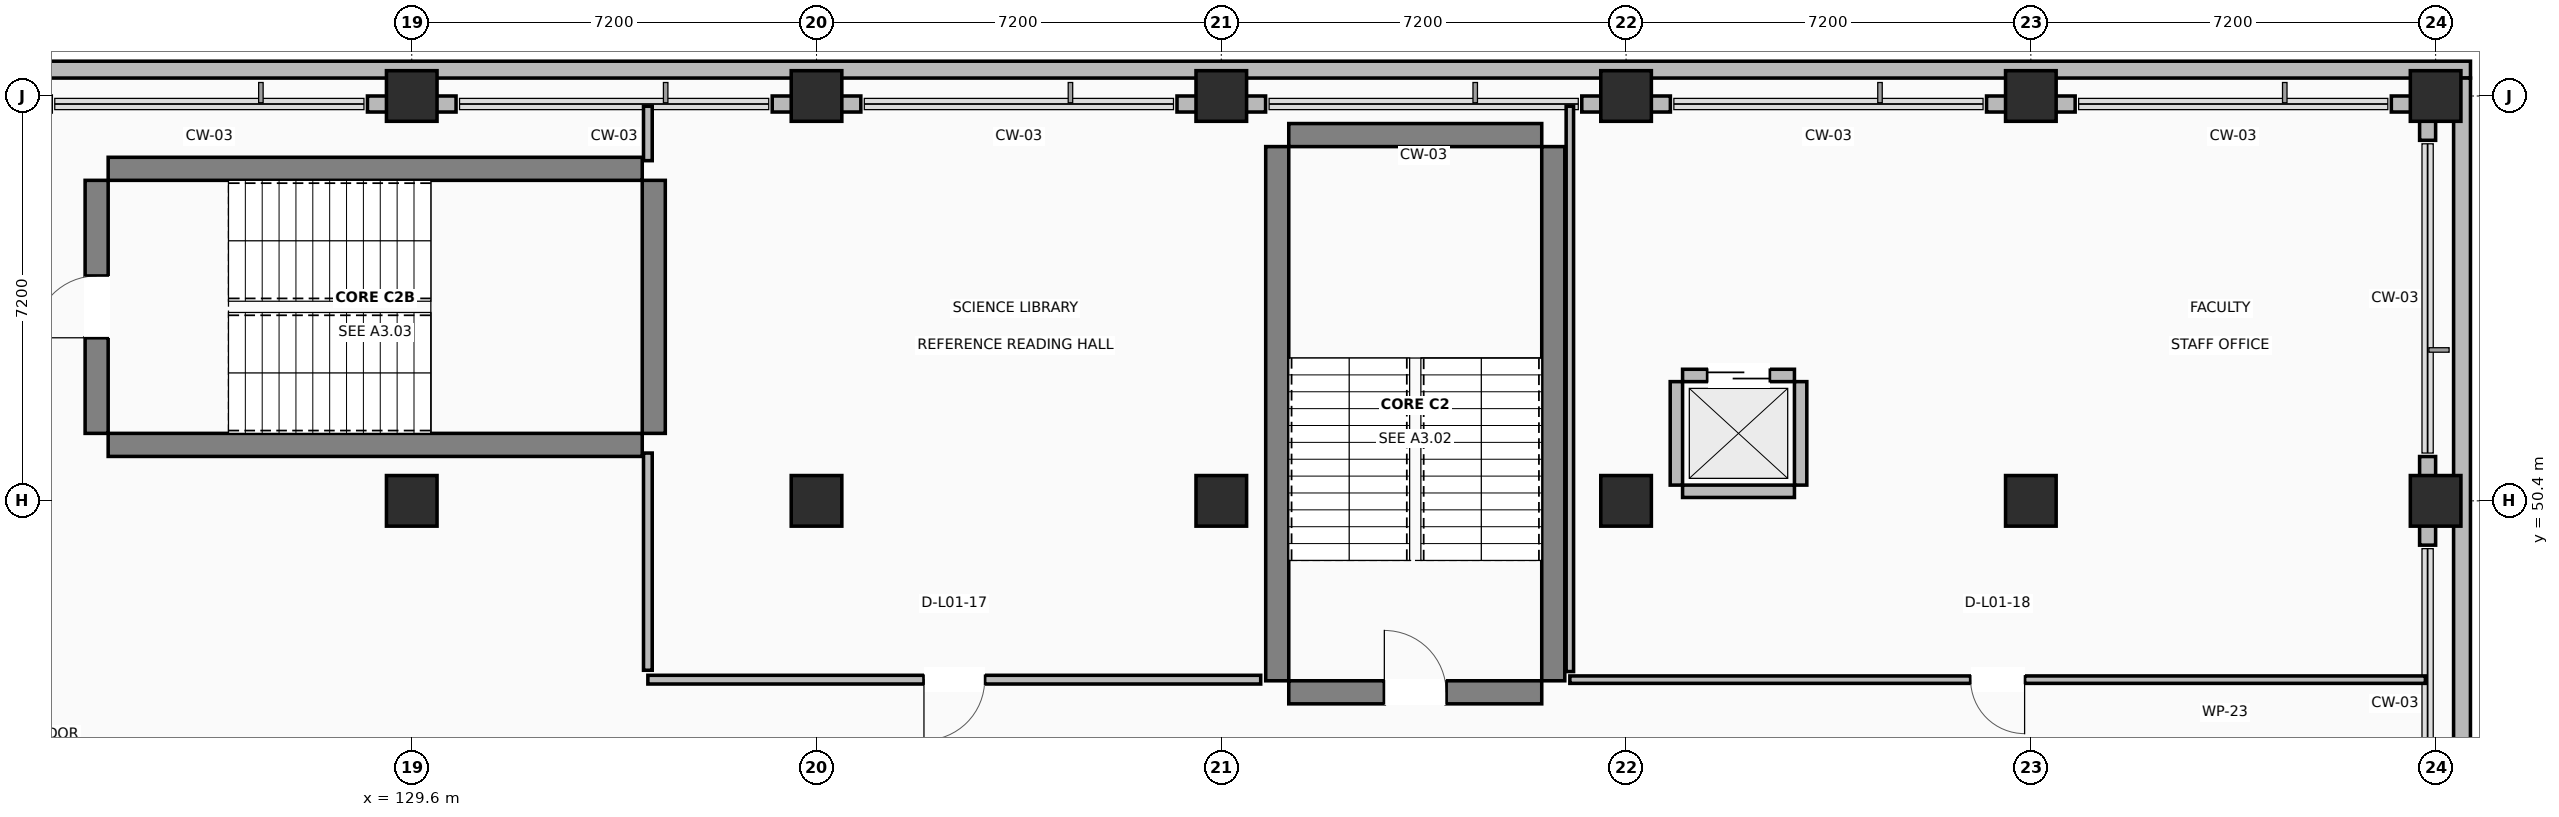
"""IFC4 building model, lengths in metres.
Left out: names, types, materials, properties, quantities, classifications, styles, units other than length and angle.
Written with IfcOpenShell. Run it as: python <this file> out.ifc"""

import sys

from ifc_helpers import new_model, si_unit, direction, frame, frame_2d, origin, origin_2d, place, context, subcontext, project, spatial, rectangle, extrude, element, fill, save


model = new_model("IFC4")
c1 = context("Model", 3, precision=1e-05, world=origin(), true_north=direction((0.0, 1.0)))
c2 = subcontext(c1, "Body", "Model", "MODEL_VIEW")
j1 = project(units=[si_unit("LENGTHUNIT", "METRE"), si_unit("PLANEANGLEUNIT", "RADIAN")], contexts=[c1])
p1 = place(None, origin())
s1 = spatial("IfcSite", under=j1, at=p1, CompositionType="ELEMENT")
p2 = place(p1, origin())
s2 = spatial("IfcBuilding", under=s1, at=p2, CompositionType="ELEMENT")
p3 = place(p2, frame((0.0, 0.0, 4.5)))
s3 = spatial("IfcBuildingStorey", under=s2, at=p3, CompositionType="ELEMENT", Elevation=4.5)
for number, where, z_axis, x_axis in (
    (1, (129.6, 50.4, 0.0), (0.0, 0.0, 1.0), (1.0, 0.0, 0.0)),
    (2, (129.6, 57.6, 0.0), (0.0, 0.0, 1.0), (1.0, 0.0, 0.0)),
    (3, (136.8, 50.4, 0.0), (0.0, 0.0, 1.0), (1.0, 0.0, 0.0)),
    (4, (136.8, 57.6, 0.0), (0.0, 0.0, 1.0), (1.0, 0.0, 0.0)),
    (5, (144.0, 50.4, 0.0), (0.0, 0.0, 1.0), (1.0, 0.0, 0.0)),
    (6, (144.0, 57.6, 0.0), (0.0, 0.0, 1.0), (1.0, 0.0, 0.0)),
    (7, (151.2, 50.4, 0.0), (0.0, 0.0, 1.0), (1.0, 0.0, 0.0)),
    (8, (151.2, 57.6, 0.0), (0.0, 0.0, 1.0), (1.0, 0.0, 0.0)),
    (9, (158.4, 50.4, 0.0), (0.0, 0.0, 1.0), (1.0, 0.0, 0.0)),
    (10, (158.4, 57.6, 0.0), (0.0, 0.0, 1.0), (1.0, 0.0, 0.0)),
    (11, (165.6, 50.4, 0.0), (0.0, 0.0, 1.0), (1.0, 0.0, 0.0)),
    (12, (165.6, 57.6, 0.0), (0.0, 0.0, 1.0), (1.0, 0.0, 0.0)),
):
    element("IfcColumn", number, at=place(p3, frame(where, z_axis=z_axis, x_axis=x_axis)), inside=s3, PredefinedType="COLUMN", context=c2, shape_type="SweptSolid", body=[
        extrude(rectangle(XDim=0.9, YDim=0.9, at=origin_2d()), origin(), (0.0, 0.0, 1.0), 4.22),
    ])
p4 = place(p3, frame((145.2, 46.995, 0.0), z_axis=(0.0, 0.0, 1.0), x_axis=(1.0, 0.0, 0.0)))
e13 = element("IfcWall", 13, at=p4, inside=s3, PredefinedType="SHEAR", context=c2, shape_type="SweptSolid", body=[
    extrude(rectangle(XDim=4.5, YDim=0.41, at=frame_2d((2.25, 0.0))), origin(), (0.0, 0.0, 1.0), 4.22),
])
p5 = place(p4, frame((1.7, 0.0, 0.0)))
e14 = element("IfcOpeningElement", 14, at=p5, cuts=e13, PredefinedType="OPENING", context=c2, shape_type="SweptSolid", body=[
    extrude(rectangle(XDim=1.1, YDim=2.15, at=frame_2d((0.55, 1.075))), frame((0.0, 0.215, 0.0), z_axis=(0.0, -1.0, 0.0), x_axis=(1.0, 0.0, 0.0)), (0.0, 0.0, 1.0), 0.43),
])
p6 = place(p3, frame((145.2, 56.905, 0.0), z_axis=(0.0, 0.0, 1.0), x_axis=(1.0, 0.0, 0.0)))
e15 = element("IfcWall", 15, at=p6, inside=s3, PredefinedType="SHEAR", context=c2, shape_type="SweptSolid", body=[
    extrude(rectangle(XDim=4.5, YDim=0.41, at=frame_2d((2.25, 0.0))), origin(), (0.0, 0.0, 1.0), 4.22),
])
for number, where, z_axis, x_axis in (
    (16, (144.995, 47.2, 0.0), (0.0, 0.0, 1.0), (0.0, 1.0, 0.0)),
    (17, (149.905, 47.2, 0.0), (0.0, 0.0, 1.0), (0.0, 1.0, 0.0)),
    (18, (124.2, 51.395, 0.0), (0.0, 0.0, 1.0), (1.0, 0.0, 0.0)),
    (19, (124.2, 56.305, 0.0), (0.0, 0.0, 1.0), (1.0, 0.0, 0.0)),
):
    element("IfcWall", number, at=place(p3, frame(where, z_axis=z_axis, x_axis=x_axis)), inside=s3, PredefinedType="SHEAR", context=c2, shape_type="SweptSolid", body=[
        extrude(rectangle(XDim=9.5, YDim=0.41, at=frame_2d((4.75, 0.0))), origin(), (0.0, 0.0, 1.0), 4.22),
    ])
p7 = place(p3, frame((123.995, 51.6, 0.0), z_axis=(0.0, 0.0, 1.0), x_axis=(0.0, 1.0, 0.0)))
e20 = element("IfcWall", 20, at=p7, inside=s3, PredefinedType="SHEAR", context=c2, shape_type="SweptSolid", body=[
    extrude(rectangle(XDim=4.5, YDim=0.41, at=frame_2d((2.25, 0.0))), origin(), (0.0, 0.0, 1.0), 4.22),
])
p8 = place(p7, frame((1.7, 0.0, 0.0)))
e21 = element("IfcOpeningElement", 21, at=p8, cuts=e20, PredefinedType="OPENING", context=c2, shape_type="SweptSolid", body=[
    extrude(rectangle(XDim=1.1, YDim=2.15, at=frame_2d((0.55, 1.075))), frame((0.0, 0.215, 0.0), z_axis=(0.0, -1.0, 0.0), x_axis=(1.0, 0.0, 0.0)), (0.0, 0.0, 1.0), 0.43),
])
p9 = place(p3, frame((133.905, 51.6, 0.0), z_axis=(0.0, 0.0, 1.0), x_axis=(0.0, 1.0, 0.0)))
e22 = element("IfcWall", 22, at=p9, inside=s3, PredefinedType="SHEAR", context=c2, shape_type="SweptSolid", body=[
    extrude(rectangle(XDim=4.5, YDim=0.41, at=frame_2d((2.25, 0.0))), origin(), (0.0, 0.0, 1.0), 4.22),
])
p10 = place(p3, frame((165.458, 49.612, 0.0), z_axis=(0.0, 0.0, 1.0), x_axis=(0.0, 1.0, 0.0)))
e23 = element("IfcWall", 23, at=p10, inside=s3, PredefinedType="STANDARD", context=c2, shape_type="SweptSolid", body=[
    extrude(rectangle(XDim=1.576, YDim=0.285, at=frame_2d((0.788, 0.0))), origin(), (0.0, 0.0, 1.0), 3.26),
])
p11 = place(p3, frame((165.458, 56.812, 0.0), z_axis=(0.0, 0.0, 1.0), x_axis=(0.0, 1.0, 0.0)))
e24 = element("IfcWall", 24, at=p11, inside=s3, PredefinedType="STANDARD", context=c2, shape_type="SweptSolid", body=[
    extrude(rectangle(XDim=0.503, YDim=0.285, at=frame_2d((0.251, 0.0))), origin(), (0.0, 0.0, 1.0), 3.26),
])
p12 = place(p3, frame((165.6, 57.458, 0.0), z_axis=(0.0, 0.0, 1.0), x_axis=(-1.0, 0.0, 0.0)))
e25 = element("IfcWall", 25, at=p12, inside=s3, PredefinedType="STANDARD", context=c2, shape_type="SweptSolid", body=[
    extrude(rectangle(XDim=0.788, YDim=0.285, at=frame_2d((0.394, 0.0))), origin(), (0.0, 0.0, 1.0), 3.26),
])
for number, where, z_axis, x_axis in (
    (26, (159.188, 57.458, 0.0), (0.0, 0.0, 1.0), (-1.0, 0.0, 0.0)),
    (27, (151.988, 57.458, 0.0), (0.0, 0.0, 1.0), (-1.0, 0.0, 0.0)),
):
    element("IfcWall", number, at=place(p3, frame(where, z_axis=z_axis, x_axis=x_axis)), inside=s3, PredefinedType="STANDARD", context=c2, shape_type="SweptSolid", body=[
        extrude(rectangle(XDim=1.576, YDim=0.285, at=frame_2d((0.788, 0.0))), origin(), (0.0, 0.0, 1.0), 3.26),
    ])
p13 = place(p3, frame((144.788, 57.458, 0.0), z_axis=(0.0, 0.0, 1.0), x_axis=(-1.0, 0.0, 0.0)))
e28 = element("IfcWall", 28, at=p13, inside=s3, PredefinedType="STANDARD", context=c2, shape_type="SweptSolid", body=[
    extrude(rectangle(XDim=1.576, YDim=0.285, at=frame_2d((0.788, 0.0))), origin(), (0.0, 0.0, 1.0), 3.26),
])
for number, where, z_axis, x_axis in (
    (29, (137.588, 57.458, 0.0), (0.0, 0.0, 1.0), (-1.0, 0.0, 0.0)),
    (30, (130.388, 57.458, 0.0), (0.0, 0.0, 1.0), (-1.0, 0.0, 0.0)),
):
    element("IfcWall", number, at=place(p3, frame(where, z_axis=z_axis, x_axis=x_axis)), inside=s3, PredefinedType="STANDARD", context=c2, shape_type="SweptSolid", body=[
        extrude(rectangle(XDim=1.576, YDim=0.285, at=frame_2d((0.788, 0.0))), origin(), (0.0, 0.0, 1.0), 3.26),
    ])
p14 = place(p3, frame((114.58, 58.069, 0.0), z_axis=(0.0, 0.0, 1.0), x_axis=(1.0, 0.0, 0.0)))
e31 = element("IfcWall", 31, at=p14, inside=s3, PredefinedType="PARAPET", context=c2, shape_type="SweptSolid", body=[
    extrude(rectangle(XDim=51.64, YDim=0.3, at=frame_2d((25.82, 0.0))), origin(), (0.0, 0.0, 1.0), 1.18),
])
p15 = place(p3, frame((166.07, 57.919, 0.0), z_axis=(0.0, 0.0, 1.0), x_axis=(-4.0288871e-05, -0.999999999188, 0.0)))
e32 = element("IfcWall", 32, at=p15, inside=s3, PredefinedType="PARAPET", context=c2, shape_type="SweptSolid", body=[
    extrude(rectangle(XDim=24.239, YDim=0.3, at=frame_2d((12.12, 0.0))), origin(), (0.0, 0.0, 1.0), 1.18),
])
p16 = place(p3, frame((152.205, 50.57, 0.0), z_axis=(0.0, 0.0, 1.0), x_axis=(1.0, 0.0, 0.0)))
e33 = element("IfcWall", 33, at=p16, inside=s3, PredefinedType="STANDARD", context=c2, shape_type="SweptSolid", body=[
    extrude(rectangle(XDim=1.99, YDim=0.22, at=frame_2d((0.995, 0.0))), origin(), (0.0, 0.0, 1.0), 3.26),
])
p17 = place(p3, frame((152.205, 52.63, 0.0), z_axis=(0.0, 0.0, 1.0), x_axis=(1.0, 0.0, 0.0)))
e34 = element("IfcWall", 34, at=p17, inside=s3, PredefinedType="STANDARD", context=c2, shape_type="SweptSolid", body=[
    extrude(rectangle(XDim=1.99, YDim=0.22, at=frame_2d((0.995, 0.0))), origin(), (0.0, 0.0, 1.0), 3.26),
])
p18 = place(p17, frame((0.445, 0.0, 0.0)))
e35 = element("IfcOpeningElement", 35, at=p18, cuts=e34, PredefinedType="OPENING", context=c2, shape_type="SweptSolid", body=[
    extrude(rectangle(XDim=1.1, YDim=2.15, at=frame_2d((0.55, 1.075))), frame((0.0, 0.12, 0.0), z_axis=(0.0, -1.0, 0.0), x_axis=(1.0, 0.0, 0.0)), (0.0, 0.0, 1.0), 0.24),
])
for number, where, z_axis, x_axis in (
    (36, (152.095, 50.68, 0.0), (0.0, 0.0, 1.0), (0.0, 1.0, 0.0)),
    (37, (154.305, 50.68, 0.0), (0.0, 0.0, 1.0), (0.0, 1.0, 0.0)),
):
    element("IfcWall", number, at=place(p3, frame(where, z_axis=z_axis, x_axis=x_axis)), inside=s3, PredefinedType="STANDARD", context=c2, shape_type="SweptSolid", body=[
        extrude(rectangle(XDim=1.84, YDim=0.22, at=frame_2d((0.92, 0.0))), origin(), (0.0, 0.0, 1.0), 3.26),
    ])
p19 = place(p3, frame((144.701, 47.22, 0.0), z_axis=(0.0, 0.0, 1.0), x_axis=(-1.0, 0.0, 0.0)))
e38 = element("IfcWall", 38, at=p19, inside=s3, PredefinedType="PARTITIONING", context=c2, shape_type="SweptSolid", body=[
    extrude(rectangle(XDim=10.901, YDim=0.155, at=frame_2d((5.45, 0.0))), origin(), (0.0, 0.0, 1.0), 3.26),
])
p20 = place(p19, frame((4.91, 0.0, 0.0)))
e39 = element("IfcOpeningElement", 39, at=p20, cuts=e38, PredefinedType="OPENING", context=c2, shape_type="SweptSolid", body=[
    extrude(rectangle(XDim=1.08, YDim=2.15, at=frame_2d((0.54, 1.075))), frame((0.0, 0.087, 0.0), z_axis=(0.0, -1.0, 0.0), x_axis=(1.0, 0.0, 0.0)), (0.0, 0.0, 1.0), 0.175),
])
p21 = place(p3, frame((133.8, 47.387, 0.0), z_axis=(0.0, 0.0, 1.0), x_axis=(0.0, 1.0, 0.0)))
e40 = element("IfcWall", 40, at=p21, inside=s3, PredefinedType="PARTITIONING", context=c2, shape_type="SweptSolid", body=[
    extrude(rectangle(XDim=3.863, YDim=0.155, at=frame_2d((1.932, 0.0))), origin(), (0.0, 0.0, 1.0), 3.26),
])
p22 = place(p3, frame((133.8, 56.45, 0.0), z_axis=(0.0, 0.0, 1.0), x_axis=(0.0, 1.0, 0.0)))
e41 = element("IfcWall", 41, at=p22, inside=s3, PredefinedType="PARTITIONING", context=c2, shape_type="SweptSolid", body=[
    extrude(rectangle(XDim=0.968, YDim=0.155, at=frame_2d((0.484, 0.0))), origin(), (0.0, 0.0, 1.0), 3.26),
])
p23 = place(p3, frame((165.418, 47.22, 0.0), z_axis=(0.0, 0.0, 1.0), x_axis=(-1.0, 0.0, 0.0)))
e42 = element("IfcWall", 42, at=p23, inside=s3, PredefinedType="PARTITIONING", context=c2, shape_type="SweptSolid", body=[
    extrude(rectangle(XDim=15.218, YDim=0.132, at=frame_2d((7.609, 0.0))), origin(), (0.0, 0.0, 1.0), 3.26),
])
p24 = place(p23, frame((7.129, 0.0, 0.0)))
e43 = element("IfcOpeningElement", 43, at=p24, cuts=e42, PredefinedType="OPENING", context=c2, shape_type="SweptSolid", body=[
    extrude(rectangle(XDim=0.96, YDim=2.1, at=frame_2d((0.48, 1.05))), frame((0.0, 0.076, 0.0), z_axis=(0.0, -1.0, 0.0), x_axis=(1.0, 0.0, 0.0)), (0.0, 0.0, 1.0), 0.152),
])
p25 = place(p3, frame((150.2, 47.364, 0.0), z_axis=(0.0, 0.0, 1.0), x_axis=(0.0, 1.0, 0.0)))
e44 = element("IfcWall", 44, at=p25, inside=s3, PredefinedType="PARTITIONING", context=c2, shape_type="SweptSolid", body=[
    extrude(rectangle(XDim=10.054, YDim=0.132, at=frame_2d((5.027, 0.0))), origin(), (0.0, 0.0, 1.0), 3.26),
])
p26 = place(p5, origin())
e45 = element("IfcDoor", 45, at=p26, inside=s3, OperationType="SINGLE_SWING_LEFT", PredefinedType="DOOR", context=c2, shape_type="SweptSolid", body=[
    extrude(rectangle(XDim=1.1, YDim=2.15, at=frame_2d((0.55, 1.075))), frame((0.0, 0.025, 0.0), z_axis=(0.0, -1.0, 0.0), x_axis=(1.0, 0.0, 0.0)), (0.0, 0.0, 1.0), 0.05),
])
fill(e14, e45)
p27 = place(p8, origin())
e46 = element("IfcDoor", 46, at=p27, inside=s3, OperationType="SINGLE_SWING_LEFT", PredefinedType="DOOR", context=c2, shape_type="SweptSolid", body=[
    extrude(rectangle(XDim=1.1, YDim=2.15, at=frame_2d((0.55, 1.075))), frame((0.0, 0.025, 0.0), z_axis=(0.0, -1.0, 0.0), x_axis=(1.0, 0.0, 0.0)), (0.0, 0.0, 1.0), 0.05),
])
fill(e21, e46)
p28 = place(p18, origin())
e47 = element("IfcDoor", 47, at=p28, inside=s3, OperationType="SLIDING_TO_LEFT", PredefinedType="DOOR", context=c2, shape_type="SweptSolid", body=[
    extrude(rectangle(XDim=1.1, YDim=2.15, at=frame_2d((0.55, 1.075))), frame((0.0, 0.025, 0.0), z_axis=(0.0, -1.0, 0.0), x_axis=(1.0, 0.0, 0.0)), (0.0, 0.0, 1.0), 0.05),
])
fill(e35, e47)
p29 = place(p20, origin())
e48 = element("IfcDoor", 48, at=p29, inside=s3, OperationType="SINGLE_SWING_RIGHT", PredefinedType="DOOR", context=c2, shape_type="SweptSolid", body=[
    extrude(rectangle(XDim=1.08, YDim=2.15, at=frame_2d((0.54, 1.075))), frame((0.0, 0.025, 0.0), z_axis=(0.0, -1.0, 0.0), x_axis=(1.0, 0.0, 0.0)), (0.0, 0.0, 1.0), 0.05),
])
fill(e39, e48)
p30 = place(p24, origin())
e49 = element("IfcDoor", 49, at=p30, inside=s3, OperationType="SINGLE_SWING_LEFT", PredefinedType="DOOR", context=c2, shape_type="SweptSolid", body=[
    extrude(rectangle(XDim=0.96, YDim=2.1, at=frame_2d((0.48, 1.05))), frame((0.0, 0.025, 0.0), z_axis=(0.0, -1.0, 0.0), x_axis=(1.0, 0.0, 0.0)), (0.0, 0.0, 1.0), 0.05),
])
fill(e43, e49)
save(model, sys.argv[1])
